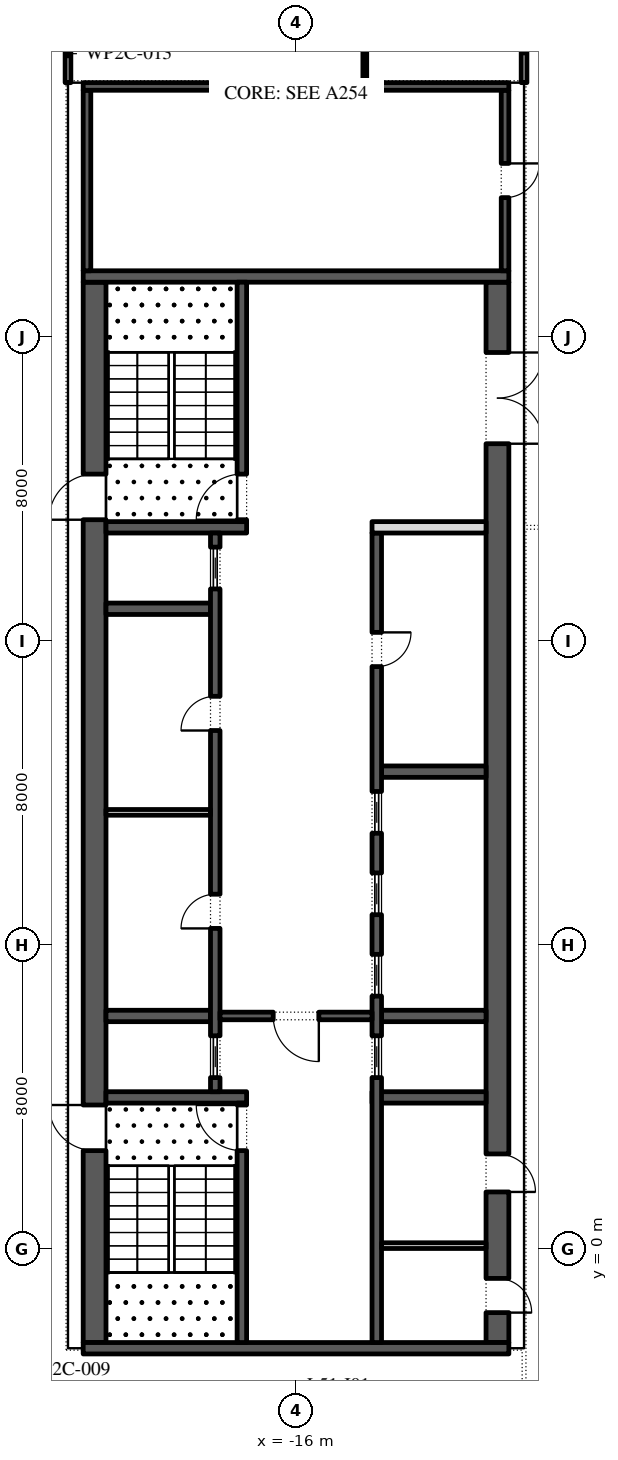
"""IFC4 building model, lengths in metres.
Left out: names, types, materials, properties, quantities, classifications, styles, units other than length and angle.
Written with IfcOpenShell. Run it as: python <this file> out.ifc"""

import sys

from ifc_helpers import new_model, si_unit, direction, frame, frame_2d, origin, place, context, subcontext, project, spatial, rectangle, extrude, element, fill, save


model = new_model("IFC4")
c1 = context("Model", 3, precision=1e-05, world=origin(), true_north=direction((0.0, 1.0)))
c2 = subcontext(c1, "Body", "Model", "MODEL_VIEW")
j1 = project(units=[si_unit("LENGTHUNIT", "METRE"), si_unit("PLANEANGLEUNIT", "RADIAN")], contexts=[c1])
p1 = place(None, origin())
s1 = spatial("IfcSite", under=j1, at=p1, CompositionType="ELEMENT")
p2 = place(p1, origin())
s2 = spatial("IfcBuilding", under=s1, at=p2, CompositionType="ELEMENT")
p3 = place(p2, frame((0.0, 0.0, 237.0)))
s3 = spatial("IfcBuildingStorey", under=s2, at=p3, CompositionType="ELEMENT", Elevation=237.0)
p4 = place(p3, frame((-21.3, -2.45, 0.0), z_axis=(0.0, 0.0, 1.0), x_axis=(0.0, 1.0, 0.0)))
e1 = element("IfcWall", 1, at=p4, inside=s3, PredefinedType="SHEAR", context=c2, shape_type="SweptSolid", body=[
    extrude(rectangle(XDim=27.9, YDim=0.6, at=frame_2d((13.95, 0.0))), origin(), (0.0, 0.0, 1.0), 5.8),
])
p5 = place(p4, frame((5.05, 0.0, 0.0)))
e2 = element("IfcOpeningElement", 2, at=p5, cuts=e1, PredefinedType="OPENING", context=c2, shape_type="SweptSolid", body=[
    extrude(rectangle(XDim=1.2, YDim=2.1, at=frame_2d((0.6, 1.05))), frame((0.0, 0.31, 0.0), z_axis=(0.0, -1.0, 0.0), x_axis=(1.0, 0.0, 0.0)), (0.0, 0.0, 1.0), 0.62),
])
p6 = place(p4, frame((21.65, 0.0, 0.0)))
e3 = element("IfcOpeningElement", 3, at=p6, cuts=e1, PredefinedType="OPENING", context=c2, shape_type="SweptSolid", body=[
    extrude(rectangle(XDim=1.2, YDim=2.1, at=frame_2d((0.6, 1.05))), frame((0.0, 0.31, 0.0), z_axis=(0.0, -1.0, 0.0), x_axis=(1.0, 0.0, 0.0)), (0.0, 0.0, 1.0), 0.62),
])
p7 = place(p3, frame((-10.7, -2.45, 0.0), z_axis=(0.0, 0.0, 1.0), x_axis=(0.0, 1.0, 0.0)))
e4 = element("IfcWall", 4, at=p7, inside=s3, PredefinedType="SHEAR", context=c2, shape_type="SweptSolid", body=[
    extrude(rectangle(XDim=27.9, YDim=0.6, at=frame_2d((13.95, 0.0))), origin(), (0.0, 0.0, 1.0), 5.8),
])
p8 = place(p7, frame((23.65, 0.0, 0.0)))
e5 = element("IfcOpeningElement", 5, at=p8, cuts=e4, PredefinedType="OPENING", context=c2, shape_type="SweptSolid", body=[
    extrude(rectangle(XDim=2.4, YDim=2.1, at=frame_2d((1.2, 1.05))), frame((0.0, 0.31, 0.0), z_axis=(0.0, -1.0, 0.0), x_axis=(1.0, 0.0, 0.0)), (0.0, 0.0, 1.0), 0.62),
])
p9 = place(p7, frame((0.788, 0.0, 0.0)))
e6 = element("IfcOpeningElement", 6, at=p9, cuts=e4, PredefinedType="OPENING", context=c2, shape_type="SweptSolid", body=[
    extrude(rectangle(XDim=0.9, YDim=2.1, at=frame_2d((0.45, 1.05))), frame((0.0, 0.31, 0.0), z_axis=(0.0, -1.0, 0.0), x_axis=(1.0, 0.0, 0.0)), (0.0, 0.0, 1.0), 0.62),
])
p10 = place(p7, frame((3.962, 0.0, 0.0)))
e7 = element("IfcOpeningElement", 7, at=p10, cuts=e4, PredefinedType="OPENING", context=c2, shape_type="SweptSolid", body=[
    extrude(rectangle(XDim=1.0, YDim=2.1, at=frame_2d((0.5, 1.05))), frame((0.0, 0.31, 0.0), z_axis=(0.0, -1.0, 0.0), x_axis=(1.0, 0.0, 0.0)), (0.0, 0.0, 1.0), 0.62),
])
for number, where, z_axis, x_axis in (
    (8, (-21.6, -2.6, 0.0), (0.0, 0.0, 1.0), (1.0, 0.0, 0.0)),
    (9, (-21.6, 25.6, 0.0), (0.0, 0.0, 1.0), (1.0, 0.0, 0.0)),
):
    element("IfcWall", number, at=place(p3, frame(where, z_axis=z_axis, x_axis=x_axis)), inside=s3, PredefinedType="SHEAR", context=c2, shape_type="SweptSolid", body=[
        extrude(rectangle(XDim=11.2, YDim=0.3, at=frame_2d((5.6, 0.0))), origin(), (0.0, 0.0, 1.0), 5.8),
    ])
p11 = place(p3, frame((-21.0, 4.0, 0.0), z_axis=(0.0, 0.0, 1.0), x_axis=(1.0, 0.0, 0.0)))
e10 = element("IfcWall", 10, at=p11, inside=s3, PredefinedType="SHEAR", context=c2, shape_type="SweptSolid", body=[
    extrude(rectangle(XDim=3.7, YDim=0.3, at=frame_2d((1.85, 0.0))), origin(), (0.0, 0.0, 1.0), 5.8),
])
p12 = place(p3, frame((-17.425, -2.45, 0.0), z_axis=(0.0, 0.0, 1.0), x_axis=(0.0, 1.0, 0.0)))
e11 = element("IfcWall", 11, at=p12, inside=s3, PredefinedType="SHEAR", context=c2, shape_type="SweptSolid", body=[
    extrude(rectangle(XDim=6.3, YDim=0.25, at=frame_2d((3.15, 0.0))), origin(), (0.0, 0.0, 1.0), 5.8),
])
p13 = place(p12, frame((5.05, 0.0, 0.0)))
e12 = element("IfcOpeningElement", 12, at=p13, cuts=e11, PredefinedType="OPENING", context=c2, shape_type="SweptSolid", body=[
    extrude(rectangle(XDim=1.2, YDim=2.1, at=frame_2d((0.6, 1.05))), frame((0.0, 0.135, 0.0), z_axis=(0.0, -1.0, 0.0), x_axis=(1.0, 0.0, 0.0)), (0.0, 0.0, 1.0), 0.27),
])
p14 = place(p3, frame((-21.0, 19.0, 0.0), z_axis=(0.0, 0.0, 1.0), x_axis=(1.0, 0.0, 0.0)))
e13 = element("IfcWall", 13, at=p14, inside=s3, PredefinedType="SHEAR", context=c2, shape_type="SweptSolid", body=[
    extrude(rectangle(XDim=3.7, YDim=0.3, at=frame_2d((1.85, 0.0))), origin(), (0.0, 0.0, 1.0), 5.8),
])
p15 = place(p3, frame((-17.425, 19.15, 0.0), z_axis=(0.0, 0.0, 1.0), x_axis=(0.0, 1.0, 0.0)))
e14 = element("IfcWall", 14, at=p15, inside=s3, PredefinedType="SHEAR", context=c2, shape_type="SweptSolid", body=[
    extrude(rectangle(XDim=6.3, YDim=0.25, at=frame_2d((3.15, 0.0))), origin(), (0.0, 0.0, 1.0), 5.8),
])
p16 = place(p15, frame((0.05, 0.0, 0.0)))
e15 = element("IfcOpeningElement", 15, at=p16, cuts=e14, PredefinedType="OPENING", context=c2, shape_type="SweptSolid", body=[
    extrude(rectangle(XDim=1.2, YDim=2.1, at=frame_2d((0.6, 1.05))), frame((0.0, 0.135, 0.0), z_axis=(0.0, -1.0, 0.0), x_axis=(1.0, 0.0, 0.0)), (0.0, 0.0, 1.0), 0.27),
])
for number, where, z_axis, x_axis in (
    (16, (-21.0, 6.143, 0.0), (0.0, 0.0, 1.0), (1.0, 0.0, 0.0)),
    (17, (-21.0, 16.857, 0.0), (0.0, 0.0, 1.0), (1.0, 0.0, 0.0)),
):
    element("IfcWall", number, at=place(p3, frame(where, z_axis=z_axis, x_axis=x_axis)), inside=s3, PredefinedType="SHEAR", context=c2, shape_type="SweptSolid", body=[
        extrude(rectangle(XDim=2.75, YDim=0.3, at=frame_2d((1.375, 0.0))), origin(), (0.0, 0.0, 1.0), 5.8),
    ])
p17 = place(p3, frame((-18.125, 4.15, 0.0), z_axis=(0.0, 0.0, 1.0), x_axis=(0.0, 1.0, 0.0)))
e18 = element("IfcWall", 18, at=p17, inside=s3, PredefinedType="SHEAR", context=c2, shape_type="SweptSolid", body=[
    extrude(rectangle(XDim=14.7, YDim=0.25, at=frame_2d((7.35, 0.0))), origin(), (0.0, 0.0, 1.0), 5.8),
])
p18 = place(p17, frame((4.296, 0.0, 0.0)))
e19 = element("IfcOpeningElement", 19, at=p18, cuts=e18, PredefinedType="OPENING", context=c2, shape_type="SweptSolid", body=[
    extrude(rectangle(XDim=0.9, YDim=2.1, at=frame_2d((0.45, 1.05))), frame((0.0, 0.135, 0.0), z_axis=(0.0, -1.0, 0.0), x_axis=(1.0, 0.0, 0.0)), (0.0, 0.0, 1.0), 0.27),
])
p19 = place(p17, frame((9.504, 0.0, 0.0)))
e20 = element("IfcOpeningElement", 20, at=p19, cuts=e18, PredefinedType="OPENING", context=c2, shape_type="SweptSolid", body=[
    extrude(rectangle(XDim=0.9, YDim=2.1, at=frame_2d((0.45, 1.05))), frame((0.0, 0.135, 0.0), z_axis=(0.0, -1.0, 0.0), x_axis=(1.0, 0.0, 0.0)), (0.0, 0.0, 1.0), 0.27),
])
p20 = place(p17, frame((0.371, 0.0, 0.0)))
e21 = element("IfcOpeningElement", 21, at=p20, cuts=e18, PredefinedType="OPENING", context=c2, shape_type="SweptSolid", body=[
    extrude(rectangle(XDim=1.1, YDim=2.1, at=frame_2d((0.55, 1.05))), frame((0.0, 0.135, 0.0), z_axis=(0.0, -1.0, 0.0), x_axis=(1.0, 0.0, 0.0)), (0.0, 0.0, 1.0), 0.27),
])
p21 = place(p17, frame((13.229, 0.0, 0.0)))
e22 = element("IfcOpeningElement", 22, at=p21, cuts=e18, PredefinedType="OPENING", context=c2, shape_type="SweptSolid", body=[
    extrude(rectangle(XDim=1.1, YDim=2.1, at=frame_2d((0.55, 1.05))), frame((0.0, 0.135, 0.0), z_axis=(0.0, -1.0, 0.0), x_axis=(1.0, 0.0, 0.0)), (0.0, 0.0, 1.0), 0.27),
])
p22 = place(p3, frame((-21.0, 11.5, 0.0), z_axis=(0.0, 0.0, 1.0), x_axis=(1.0, 0.0, 0.0)))
e23 = element("IfcWall", 23, at=p22, inside=s3, PredefinedType="PARTITIONING", context=c2, shape_type="SweptSolid", body=[
    extrude(rectangle(XDim=2.75, YDim=0.15, at=frame_2d((1.375, 0.0))), origin(), (0.0, 0.0, 1.0), 5.8),
])
p23 = place(p3, frame((-14.0, 4.0, 0.0), z_axis=(0.0, 0.0, 1.0), x_axis=(1.0, 0.0, 0.0)))
e24 = element("IfcWall", 24, at=p23, inside=s3, PredefinedType="SHEAR", context=c2, shape_type="SweptSolid", body=[
    extrude(rectangle(XDim=3.0, YDim=0.3, at=frame_2d((1.5, 0.0))), origin(), (0.0, 0.0, 1.0), 5.8),
])
for number, where, z_axis, x_axis in (
    (25, (-13.75, 6.143, 0.0), (0.0, 0.0, 1.0), (1.0, 0.0, 0.0)),
    (26, (-13.75, 12.571, 0.0), (0.0, 0.0, 1.0), (1.0, 0.0, 0.0)),
):
    element("IfcWall", number, at=place(p3, frame(where, z_axis=z_axis, x_axis=x_axis)), inside=s3, PredefinedType="SHEAR", context=c2, shape_type="SweptSolid", body=[
        extrude(rectangle(XDim=2.75, YDim=0.3, at=frame_2d((1.375, 0.0))), origin(), (0.0, 0.0, 1.0), 5.8),
    ])
p24 = place(p3, frame((-13.875, -2.45, 0.0), z_axis=(0.0, 0.0, 1.0), x_axis=(0.0, 1.0, 0.0)))
e27 = element("IfcWall", 27, at=p24, inside=s3, PredefinedType="SHEAR", context=c2, shape_type="SweptSolid", body=[
    extrude(rectangle(XDim=21.3, YDim=0.25, at=frame_2d((10.65, 0.0))), origin(), (0.0, 0.0, 1.0), 5.8),
])
p25 = place(p24, frame((17.786, 0.0, 0.0)))
e28 = element("IfcOpeningElement", 28, at=p25, cuts=e27, PredefinedType="OPENING", context=c2, shape_type="SweptSolid", body=[
    extrude(rectangle(XDim=0.9, YDim=2.1, at=frame_2d((0.45, 1.05))), frame((0.0, 0.135, 0.0), z_axis=(0.0, -1.0, 0.0), x_axis=(1.0, 0.0, 0.0)), (0.0, 0.0, 1.0), 0.27),
])
p26 = place(p24, frame((6.971, 0.0, 0.0)))
e29 = element("IfcOpeningElement", 29, at=p26, cuts=e27, PredefinedType="OPENING", context=c2, shape_type="SweptSolid", body=[
    extrude(rectangle(XDim=1.1, YDim=2.1, at=frame_2d((0.55, 1.05))), frame((0.0, 0.135, 0.0), z_axis=(0.0, -1.0, 0.0), x_axis=(1.0, 0.0, 0.0)), (0.0, 0.0, 1.0), 0.27),
])
p27 = place(p24, frame((9.114, 0.0, 0.0)))
e30 = element("IfcOpeningElement", 30, at=p27, cuts=e27, PredefinedType="OPENING", context=c2, shape_type="SweptSolid", body=[
    extrude(rectangle(XDim=1.1, YDim=2.1, at=frame_2d((0.55, 1.05))), frame((0.0, 0.135, 0.0), z_axis=(0.0, -1.0, 0.0), x_axis=(1.0, 0.0, 0.0)), (0.0, 0.0, 1.0), 0.27),
])
p28 = place(p24, frame((11.257, 0.0, 0.0)))
e31 = element("IfcOpeningElement", 31, at=p28, cuts=e27, PredefinedType="OPENING", context=c2, shape_type="SweptSolid", body=[
    extrude(rectangle(XDim=1.1, YDim=2.1, at=frame_2d((0.55, 1.05))), frame((0.0, 0.135, 0.0), z_axis=(0.0, -1.0, 0.0), x_axis=(1.0, 0.0, 0.0)), (0.0, 0.0, 1.0), 0.27),
])
p29 = place(p24, frame((13.4, 0.0, 0.0)))
e32 = element("IfcOpeningElement", 32, at=p29, cuts=e27, PredefinedType="OPENING", context=c2, shape_type="SweptSolid", body=[
    extrude(rectangle(XDim=1.1, YDim=2.1, at=frame_2d((0.55, 1.05))), frame((0.0, 0.135, 0.0), z_axis=(0.0, -1.0, 0.0), x_axis=(1.0, 0.0, 0.0)), (0.0, 0.0, 1.0), 0.27),
])
p30 = place(p3, frame((-14.0, 19.0, 0.0), z_axis=(0.0, 0.0, 1.0), x_axis=(1.0, 0.0, 0.0)))
e33 = element("IfcWall", 33, at=p30, inside=s3, PredefinedType="PARTITIONING", context=c2, shape_type="SweptSolid", body=[
    extrude(rectangle(XDim=3.0, YDim=0.3, at=frame_2d((1.5, 0.0))), origin(), (0.0, 0.0, 1.0), 5.8),
])
p31 = place(p3, frame((-18.0, 6.143, 0.0), z_axis=(0.0, 0.0, 1.0), x_axis=(1.0, 0.0, 0.0)))
e34 = element("IfcWall", 34, at=p31, inside=s3, PredefinedType="SHEAR", context=c2, shape_type="SweptSolid", body=[
    extrude(rectangle(XDim=4.0, YDim=0.2, at=frame_2d((2.0, 0.0))), origin(), (0.0, 0.0, 1.0), 5.8),
])
p32 = place(p31, frame((1.4, 0.0, 0.0)))
e35 = element("IfcOpeningElement", 35, at=p32, cuts=e34, PredefinedType="OPENING", context=c2, shape_type="SweptSolid", body=[
    extrude(rectangle(XDim=1.2, YDim=2.1, at=frame_2d((0.6, 1.05))), frame((0.0, 0.11, 0.0), z_axis=(0.0, -1.0, 0.0), x_axis=(1.0, 0.0, 0.0)), (0.0, 0.0, 1.0), 0.22),
])
p33 = place(p3, frame((-13.75, 0.1, 0.0), z_axis=(0.0, 0.0, 1.0), x_axis=(1.0, 0.0, 0.0)))
e36 = element("IfcWall", 36, at=p33, inside=s3, PredefinedType="PARTITIONING", context=c2, shape_type="SweptSolid", body=[
    extrude(rectangle(XDim=2.75, YDim=0.15, at=frame_2d((1.375, 0.0))), origin(), (0.0, 0.0, 1.0), 5.8),
])
p34 = place(p3, frame((-21.5, 25.75, 0.0), z_axis=(0.0, 0.0, 1.0), x_axis=(0.0, 1.0, 0.0)))
e37 = element("IfcWall", 37, at=p34, inside=s3, PredefinedType="SHEAR", context=c2, shape_type="SweptSolid", body=[
    extrude(rectangle(XDim=4.75, YDim=0.2, at=frame_2d((2.375, 0.0))), origin(), (0.0, 0.0, 1.0), 5.8),
])
p35 = place(p3, frame((-10.5, 25.75, 0.0), z_axis=(0.0, 0.0, 1.0), x_axis=(0.0, 1.0, 0.0)))
e38 = element("IfcWall", 38, at=p35, inside=s3, PredefinedType="SHEAR", context=c2, shape_type="SweptSolid", body=[
    extrude(rectangle(XDim=4.75, YDim=0.2, at=frame_2d((2.375, 0.0))), origin(), (0.0, 0.0, 1.0), 5.8),
])
p36 = place(p35, frame((1.925, 0.0, 0.0)))
e39 = element("IfcOpeningElement", 39, at=p36, cuts=e38, PredefinedType="OPENING", context=c2, shape_type="SweptSolid", body=[
    extrude(rectangle(XDim=0.9, YDim=2.1, at=frame_2d((0.45, 1.05))), frame((0.0, 0.11, 0.0), z_axis=(0.0, -1.0, 0.0), x_axis=(1.0, 0.0, 0.0)), (0.0, 0.0, 1.0), 0.22),
])
p37 = place(p3, frame((-21.6, 30.6, 0.0), z_axis=(0.0, 0.0, 1.0), x_axis=(1.0, 0.0, 0.0)))
e40 = element("IfcWall", 40, at=p37, inside=s3, PredefinedType="SHEAR", context=c2, shape_type="SweptSolid", body=[
    extrude(rectangle(XDim=11.2, YDim=0.2, at=frame_2d((5.6, 0.0))), origin(), (0.0, 0.0, 1.0), 5.8),
])
p38 = place(p3, frame((-22.0, 32.225, 0.0), z_axis=(0.0, 0.0, 1.0), x_axis=(0.0, -1.0, 0.0)))
e41 = element("IfcWall", 41, at=p38, inside=s3, PredefinedType="PARTITIONING", context=c2, shape_type="SweptSolid", body=[
    extrude(rectangle(XDim=1.525, YDim=0.15, at=frame_2d((0.763, 0.0))), origin(), (0.0, 0.0, 1.0), 5.8),
])
p39 = place(p3, frame((-14.19, 30.7, 0.0), z_axis=(0.0, 0.0, 1.0), x_axis=(0.0, 1.0, 0.0)))
e42 = element("IfcWall", 42, at=p39, inside=s3, PredefinedType="PARTITIONING", context=c2, shape_type="SweptSolid", body=[
    extrude(rectangle(XDim=5.85, YDim=0.1, at=frame_2d((2.925, 0.0))), origin(), (0.0, 0.0, 1.0), 5.8),
])
p40 = place(p3, frame((-10.0, 30.7, 0.0), z_axis=(0.0, 0.0, 1.0), x_axis=(0.0, 1.0, 0.0)))
e43 = element("IfcWall", 43, at=p40, inside=s3, PredefinedType="PARTITIONING", context=c2, shape_type="SweptSolid", body=[
    extrude(rectangle(XDim=1.675, YDim=0.15, at=frame_2d((0.837, 0.0))), origin(), (0.0, 0.0, 1.0), 4.82),
])
p41 = place(p18, origin())
e44 = element("IfcDoor", 44, at=p41, inside=s3, OperationType="SINGLE_SWING_RIGHT", PredefinedType="DOOR", context=c2, shape_type="SweptSolid", body=[
    extrude(rectangle(XDim=0.9, YDim=2.1, at=frame_2d((0.45, 1.05))), frame((0.0, 0.125, 0.0), z_axis=(0.0, -1.0, 0.0), x_axis=(1.0, 0.0, 0.0)), (0.0, 0.0, 1.0), 0.05),
])
fill(e19, e44)
p42 = place(p19, origin())
e45 = element("IfcDoor", 45, at=p42, inside=s3, OperationType="SINGLE_SWING_RIGHT", PredefinedType="DOOR", context=c2, shape_type="SweptSolid", body=[
    extrude(rectangle(XDim=0.9, YDim=2.1, at=frame_2d((0.45, 1.05))), frame((0.0, 0.125, 0.0), z_axis=(0.0, -1.0, 0.0), x_axis=(1.0, 0.0, 0.0)), (0.0, 0.0, 1.0), 0.05),
])
fill(e20, e45)
p43 = place(p20, origin())
e46 = element("IfcDoor", 46, at=p43, inside=s3, OperationType="SLIDING_TO_LEFT", PredefinedType="DOOR", context=c2, shape_type="SweptSolid", body=[
    extrude(rectangle(XDim=1.1, YDim=2.1, at=frame_2d((0.55, 1.05))), frame((0.0, 0.025, 0.0), z_axis=(0.0, -1.0, 0.0), x_axis=(1.0, 0.0, 0.0)), (0.0, 0.0, 1.0), 0.05),
])
fill(e21, e46)
p44 = place(p21, origin())
e47 = element("IfcDoor", 47, at=p44, inside=s3, OperationType="SLIDING_TO_LEFT", PredefinedType="DOOR", context=c2, shape_type="SweptSolid", body=[
    extrude(rectangle(XDim=1.1, YDim=2.1, at=frame_2d((0.55, 1.05))), frame((0.0, 0.025, 0.0), z_axis=(0.0, -1.0, 0.0), x_axis=(1.0, 0.0, 0.0)), (0.0, 0.0, 1.0), 0.05),
])
fill(e22, e47)
p45 = place(p25, frame((0.9, -0.2, 0.0), z_axis=(0.0, 0.0, 1.0), x_axis=(-1.0, 0.0, 0.0)))
e48 = element("IfcDoor", 48, at=p45, inside=s3, OperationType="SINGLE_SWING_RIGHT", PredefinedType="DOOR", context=c2, shape_type="SweptSolid", body=[
    extrude(rectangle(XDim=0.9, YDim=2.1, at=frame_2d((0.45, 1.05))), frame((0.0, -0.075, 0.0), z_axis=(0.0, -1.0, 0.0), x_axis=(1.0, 0.0, 0.0)), (0.0, 0.0, 1.0), 0.05),
])
fill(e28, e48)
p46 = place(p26, origin())
e49 = element("IfcDoor", 49, at=p46, inside=s3, OperationType="SLIDING_TO_LEFT", PredefinedType="DOOR", context=c2, shape_type="SweptSolid", body=[
    extrude(rectangle(XDim=1.1, YDim=2.1, at=frame_2d((0.55, 1.05))), frame((0.0, 0.025, 0.0), z_axis=(0.0, -1.0, 0.0), x_axis=(1.0, 0.0, 0.0)), (0.0, 0.0, 1.0), 0.05),
])
fill(e29, e49)
p47 = place(p27, origin())
e50 = element("IfcDoor", 50, at=p47, inside=s3, OperationType="SLIDING_TO_LEFT", PredefinedType="DOOR", context=c2, shape_type="SweptSolid", body=[
    extrude(rectangle(XDim=1.1, YDim=2.1, at=frame_2d((0.55, 1.05))), frame((0.0, 0.025, 0.0), z_axis=(0.0, -1.0, 0.0), x_axis=(1.0, 0.0, 0.0)), (0.0, 0.0, 1.0), 0.05),
])
fill(e30, e50)
p48 = place(p28, origin())
e51 = element("IfcDoor", 51, at=p48, inside=s3, OperationType="SLIDING_TO_LEFT", PredefinedType="DOOR", context=c2, shape_type="SweptSolid", body=[
    extrude(rectangle(XDim=1.1, YDim=2.1, at=frame_2d((0.55, 1.05))), frame((0.0, 0.025, 0.0), z_axis=(0.0, -1.0, 0.0), x_axis=(1.0, 0.0, 0.0)), (0.0, 0.0, 1.0), 0.05),
])
fill(e31, e51)
p49 = place(p29, origin())
e52 = element("IfcDoor", 52, at=p49, inside=s3, OperationType="SLIDING_TO_LEFT", PredefinedType="DOOR", context=c2, shape_type="SweptSolid", body=[
    extrude(rectangle(XDim=1.1, YDim=2.1, at=frame_2d((0.55, 1.05))), frame((0.0, 0.025, 0.0), z_axis=(0.0, -1.0, 0.0), x_axis=(1.0, 0.0, 0.0)), (0.0, 0.0, 1.0), 0.05),
])
fill(e32, e52)
p50 = place(p32, frame((1.2, 0.0, 0.0), z_axis=(0.0, 0.0, 1.0), x_axis=(-1.0, 0.0, 0.0)))
e53 = element("IfcDoor", 53, at=p50, inside=s3, OperationType="SINGLE_SWING_RIGHT", PredefinedType="DOOR", context=c2, shape_type="SweptSolid", body=[
    extrude(rectangle(XDim=1.2, YDim=2.1, at=frame_2d((0.6, 1.05))), frame((0.0, 0.025, 0.0), z_axis=(0.0, -1.0, 0.0), x_axis=(1.0, 0.0, 0.0)), (0.0, 0.0, 1.0), 0.05),
])
fill(e35, e53)
p51 = place(p8, frame((2.4, 0.0, 0.0), z_axis=(0.0, 0.0, 1.0), x_axis=(-1.0, 0.0, 0.0)))
e54 = element("IfcDoor", 54, at=p51, inside=s3, OperationType="DOUBLE_DOOR_SINGLE_SWING", PredefinedType="DOOR", context=c2, shape_type="SweptSolid", body=[
    extrude(rectangle(XDim=2.4, YDim=2.1, at=frame_2d((1.2, 1.05))), frame((0.0, 0.025, 0.0), z_axis=(0.0, -1.0, 0.0), x_axis=(1.0, 0.0, 0.0)), (0.0, 0.0, 1.0), 0.05),
])
fill(e5, e54)
p52 = place(p13, origin())
e55 = element("IfcDoor", 55, at=p52, inside=s3, OperationType="SINGLE_SWING_LEFT", PredefinedType="DOOR", context=c2, shape_type="SweptSolid", body=[
    extrude(rectangle(XDim=1.2, YDim=2.1, at=frame_2d((0.6, 1.05))), frame((0.0, 0.025, 0.0), z_axis=(0.0, -1.0, 0.0), x_axis=(1.0, 0.0, 0.0)), (0.0, 0.0, 1.0), 0.05),
])
fill(e12, e55)
p53 = place(p5, origin())
e56 = element("IfcDoor", 56, at=p53, inside=s3, OperationType="SINGLE_SWING_LEFT", PredefinedType="DOOR", context=c2, shape_type="SweptSolid", body=[
    extrude(rectangle(XDim=1.2, YDim=2.1, at=frame_2d((0.6, 1.05))), frame((0.0, 0.025, 0.0), z_axis=(0.0, -1.0, 0.0), x_axis=(1.0, 0.0, 0.0)), (0.0, 0.0, 1.0), 0.05),
])
fill(e2, e56)
p54 = place(p16, origin())
e57 = element("IfcDoor", 57, at=p54, inside=s3, OperationType="SINGLE_SWING_RIGHT", PredefinedType="DOOR", context=c2, shape_type="SweptSolid", body=[
    extrude(rectangle(XDim=1.2, YDim=2.1, at=frame_2d((0.6, 1.05))), frame((0.0, 0.025, 0.0), z_axis=(0.0, -1.0, 0.0), x_axis=(1.0, 0.0, 0.0)), (0.0, 0.0, 1.0), 0.05),
])
fill(e15, e57)
p55 = place(p6, origin())
e58 = element("IfcDoor", 58, at=p55, inside=s3, OperationType="SINGLE_SWING_RIGHT", PredefinedType="DOOR", context=c2, shape_type="SweptSolid", body=[
    extrude(rectangle(XDim=1.2, YDim=2.1, at=frame_2d((0.6, 1.05))), frame((0.0, 0.025, 0.0), z_axis=(0.0, -1.0, 0.0), x_axis=(1.0, 0.0, 0.0)), (0.0, 0.0, 1.0), 0.05),
])
fill(e3, e58)
p56 = place(p9, frame((0.9, 0.55, 0.0), z_axis=(0.0, 0.0, 1.0), x_axis=(-1.0, 0.0, 0.0)))
e59 = element("IfcDoor", 59, at=p56, inside=s3, OperationType="SINGLE_SWING_LEFT", PredefinedType="DOOR", context=c2, shape_type="SweptSolid", body=[
    extrude(rectangle(XDim=0.9, YDim=2.1, at=frame_2d((0.45, 1.05))), frame((0.0, 0.3, 0.0), z_axis=(0.0, -1.0, 0.0), x_axis=(1.0, 0.0, 0.0)), (0.0, 0.0, 1.0), 0.05),
])
fill(e6, e59)
p57 = place(p10, frame((1.0, 0.55, 0.0), z_axis=(0.0, 0.0, 1.0), x_axis=(-1.0, 0.0, 0.0)))
e60 = element("IfcDoor", 60, at=p57, inside=s3, OperationType="SINGLE_SWING_LEFT", PredefinedType="DOOR", context=c2, shape_type="SweptSolid", body=[
    extrude(rectangle(XDim=1.0, YDim=2.1, at=frame_2d((0.5, 1.05))), frame((0.0, 0.3, 0.0), z_axis=(0.0, -1.0, 0.0), x_axis=(1.0, 0.0, 0.0)), (0.0, 0.0, 1.0), 0.05),
])
fill(e7, e60)
p58 = place(p36, frame((0.9, 0.15, 0.0), z_axis=(0.0, 0.0, 1.0), x_axis=(-1.0, 0.0, 0.0)))
e61 = element("IfcDoor", 61, at=p58, inside=s3, OperationType="SINGLE_SWING_RIGHT", PredefinedType="DOOR", context=c2, shape_type="SweptSolid", body=[
    extrude(rectangle(XDim=0.9, YDim=2.1, at=frame_2d((0.45, 1.05))), frame((0.0, 0.1, 0.0), z_axis=(0.0, -1.0, 0.0), x_axis=(1.0, 0.0, 0.0)), (0.0, 0.0, 1.0), 0.05),
])
fill(e39, e61)
save(model, sys.argv[1])
